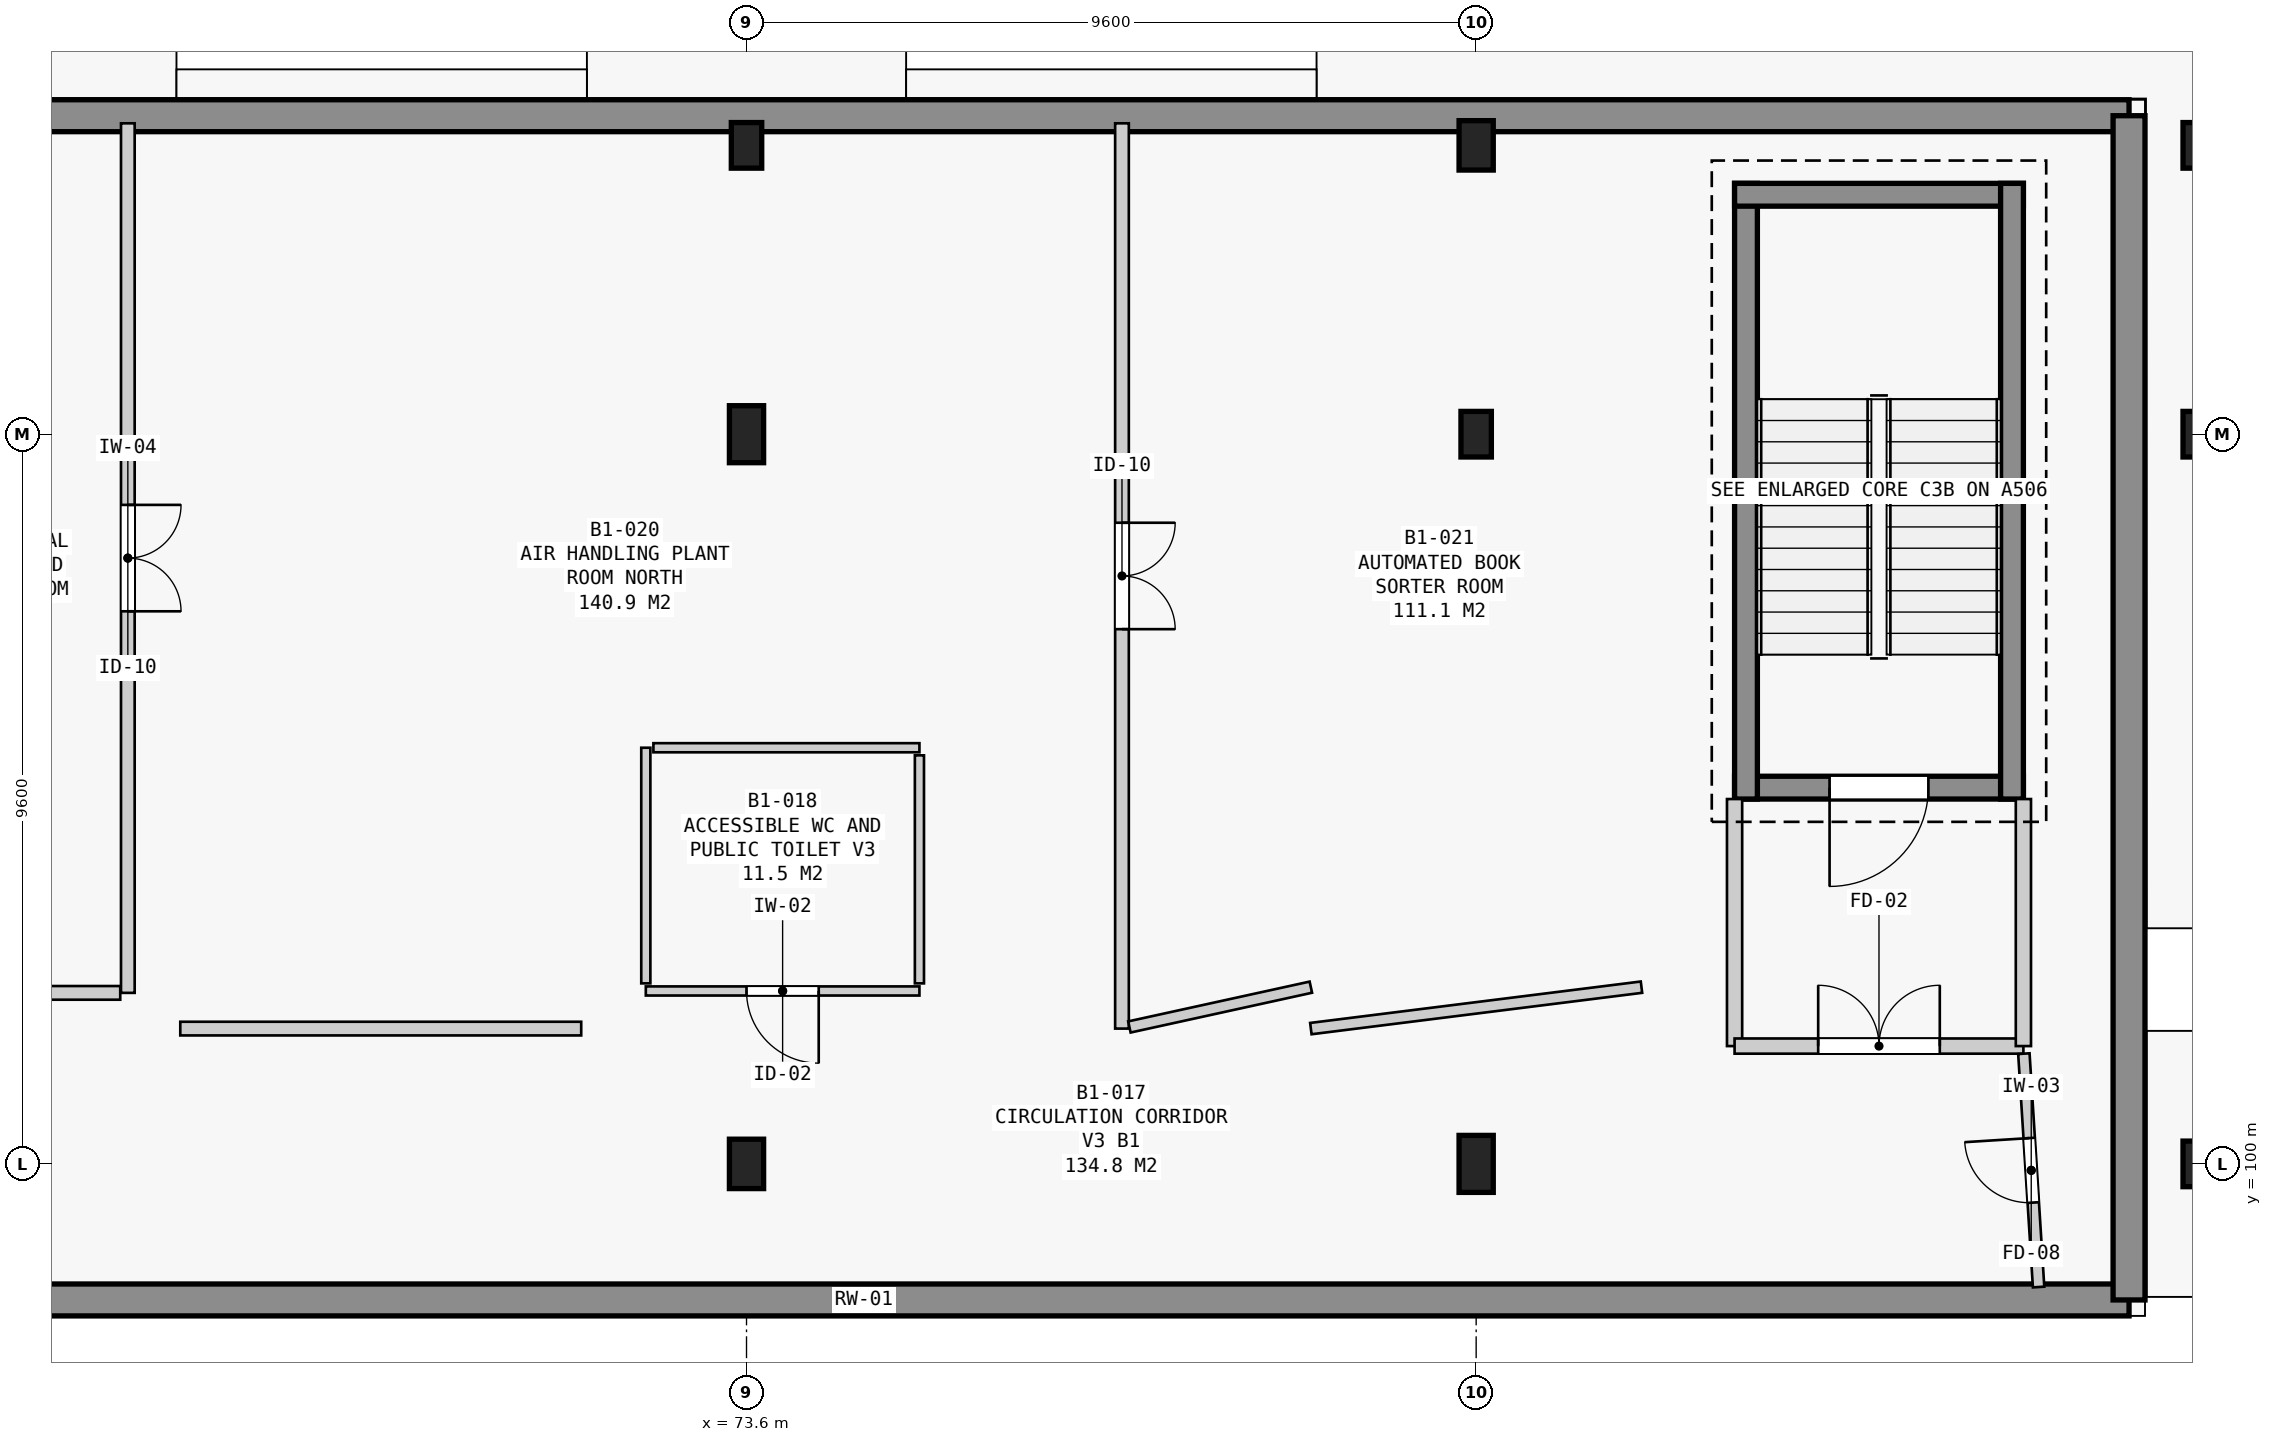
"""IFC4 building model, lengths in metres.
Left out: names, types, materials, properties, quantities, classifications, styles, units other than length and angle.
Written with IfcOpenShell. Run it as: python <this file> out.ifc"""

import sys

from ifc_helpers import new_model, si_unit, direction, frame, frame_2d, origin, origin_2d, place, context, subcontext, project, spatial, rectangle, extrude, element, fill, save


model = new_model("IFC4")
c1 = context("Model", 3, precision=1e-05, world=origin(), true_north=direction((0.0, 1.0)))
c2 = subcontext(c1, "Body", "Model", "MODEL_VIEW")
j1 = project(units=[si_unit("LENGTHUNIT", "METRE"), si_unit("PLANEANGLEUNIT", "RADIAN")], contexts=[c1])
p1 = place(None, origin())
s1 = spatial("IfcSite", under=j1, at=p1, CompositionType="ELEMENT")
p2 = place(p1, origin())
s2 = spatial("IfcBuilding", under=s1, at=p2, CompositionType="ELEMENT")
p3 = place(p2, frame((0.0, 0.0, -4.5)))
s3 = spatial("IfcBuildingStorey", under=s2, at=p3, CompositionType="ELEMENT", Elevation=-4.5)
p4 = place(p3, frame((73.6, 100.0, 0.0), z_axis=(0.0, 0.0, 1.0), x_axis=(1.0, 0.0, 0.0)))
e1 = element("IfcColumn", 1, at=p4, inside=s3, PredefinedType="COLUMN", context=c2, shape_type="SweptSolid", body=[
    extrude(rectangle(XDim=0.45, YDim=0.65, at=origin_2d()), origin(), (0.0, 0.0, 1.0), 4.5),
])
p5 = place(p3, frame((73.6, 109.6, 0.0), z_axis=(0.0, 0.0, 1.0), x_axis=(1.0, 0.0, 0.0)))
e2 = element("IfcColumn", 2, at=p5, inside=s3, PredefinedType="COLUMN", context=c2, shape_type="SweptSolid", body=[
    extrude(rectangle(XDim=0.45, YDim=0.75, at=origin_2d()), origin(), (0.0, 0.0, 1.0), 4.5),
])
p6 = place(p3, frame((73.6, 113.4, 0.0), z_axis=(0.0, 0.0, 1.0), x_axis=(1.0, 0.0, 0.0)))
e3 = element("IfcColumn", 3, at=p6, inside=s3, PredefinedType="COLUMN", context=c2, shape_type="SweptSolid", body=[
    extrude(rectangle(XDim=0.4, YDim=0.6, at=origin_2d()), origin(), (0.0, 0.0, 1.0), 4.5),
])
p7 = place(p3, frame((83.2, 100.0, 0.0), z_axis=(0.0, 0.0, 1.0), x_axis=(1.0, 0.0, 0.0)))
e4 = element("IfcColumn", 4, at=p7, inside=s3, PredefinedType="COLUMN", context=c2, shape_type="SweptSolid", body=[
    extrude(rectangle(XDim=0.45, YDim=0.75, at=origin_2d()), origin(), (0.0, 0.0, 1.0), 4.5),
])
p8 = place(p3, frame((83.2, 109.6, 0.0), z_axis=(0.0, 0.0, 1.0), x_axis=(1.0, 0.0, 0.0)))
e5 = element("IfcColumn", 5, at=p8, inside=s3, PredefinedType="COLUMN", context=c2, shape_type="SweptSolid", body=[
    extrude(rectangle(XDim=0.4, YDim=0.6, at=origin_2d()), origin(), (0.0, 0.0, 1.0), 4.5),
])
p9 = place(p3, frame((83.2, 113.4, 0.0), z_axis=(0.0, 0.0, 1.0), x_axis=(1.0, 0.0, 0.0)))
e6 = element("IfcColumn", 6, at=p9, inside=s3, PredefinedType="COLUMN", context=c2, shape_type="SweptSolid", body=[
    extrude(rectangle(XDim=0.45, YDim=0.65, at=origin_2d()), origin(), (0.0, 0.0, 1.0), 4.5),
])
for number, where, z_axis, x_axis in (
    (7, (92.8, 100.0, 0.0), (0.0, 0.0, 1.0), (1.0, 0.0, 0.0)),
    (8, (92.8, 109.6, 0.0), (0.0, 0.0, 1.0), (1.0, 0.0, 0.0)),
    (9, (92.8, 113.4, 0.0), (0.0, 0.0, 1.0), (1.0, 0.0, 0.0)),
):
    element("IfcColumn", number, at=place(p3, frame(where, z_axis=z_axis, x_axis=x_axis)), inside=s3, PredefinedType="COLUMN", context=c2, shape_type="SweptSolid", body=[
        extrude(rectangle(XDim=0.6, YDim=0.6, at=origin_2d()), origin(), (0.0, 0.0, 1.0), 4.5),
    ])
for number, where, z_axis, x_axis in (
    (10, (91.79, 98.21, 0.0), (0.0, 0.0, 1.0), (-1.0, 0.0, 0.0)),
    (11, (52.21, 113.79, 0.0), (0.0, 0.0, 1.0), (1.0, 0.0, 0.0)),
):
    element("IfcWall", number, at=place(p3, frame(where, z_axis=z_axis, x_axis=x_axis)), inside=s3, PredefinedType="SOLIDWALL", context=c2, shape_type="SweptSolid", body=[
        extrude(rectangle(XDim=39.58, YDim=0.42, at=frame_2d((19.79, 0.0))), origin(), (0.0, 0.0, 1.0), 4.5),
    ])
p10 = place(p3, frame((91.79, 113.79, 0.0), z_axis=(0.0, 0.0, 1.0), x_axis=(0.0, -1.0, 0.0)))
e12 = element("IfcWall", 12, at=p10, inside=s3, PredefinedType="SOLIDWALL", context=c2, shape_type="SweptSolid", body=[
    extrude(rectangle(XDim=15.58, YDim=0.42, at=frame_2d((7.79, 0.0))), origin(), (0.0, 0.0, 1.0), 4.5),
])
p11 = place(p3, frame((90.4, 104.95, 0.0), z_axis=(0.0, 0.0, 1.0), x_axis=(-1.0, 0.0, 0.0)))
e13 = element("IfcWall", 13, at=p11, inside=s3, PredefinedType="SHEAR", context=c2, shape_type="SweptSolid", body=[
    extrude(rectangle(XDim=3.8, YDim=0.3, at=frame_2d((1.9, 0.0))), origin(), (0.0, 0.0, 1.0), 4.1),
])
p12 = place(p11, frame((1.25, 0.0, 0.0)))
e14 = element("IfcOpeningElement", 14, at=p12, cuts=e13, PredefinedType="OPENING", context=c2, shape_type="SweptSolid", body=[
    extrude(rectangle(XDim=1.3, YDim=2.2, at=frame_2d((0.65, 1.1))), frame((0.0, 0.16, 0.0), z_axis=(0.0, -1.0, 0.0), x_axis=(1.0, 0.0, 0.0)), (0.0, 0.0, 1.0), 0.32),
])
p13 = place(p3, frame((86.75, 104.8, 0.0), z_axis=(0.0, 0.0, 1.0), x_axis=(0.0, 1.0, 0.0)))
e15 = element("IfcWall", 15, at=p13, inside=s3, PredefinedType="SHEAR", context=c2, shape_type="SweptSolid", body=[
    extrude(rectangle(XDim=8.1, YDim=0.3, at=frame_2d((4.05, 0.0))), origin(), (0.0, 0.0, 1.0), 4.1),
])
p14 = place(p3, frame((86.6, 112.75, 0.0), z_axis=(0.0, 0.0, 1.0), x_axis=(1.0, 0.0, 0.0)))
e16 = element("IfcWall", 16, at=p14, inside=s3, PredefinedType="SHEAR", context=c2, shape_type="SweptSolid", body=[
    extrude(rectangle(XDim=3.8, YDim=0.3, at=frame_2d((1.9, 0.0))), origin(), (0.0, 0.0, 1.0), 4.1),
])
p15 = place(p3, frame((90.25, 112.9, 0.0), z_axis=(0.0, 0.0, 1.0), x_axis=(0.0, -1.0, 0.0)))
e17 = element("IfcWall", 17, at=p15, inside=s3, PredefinedType="SHEAR", context=c2, shape_type="SweptSolid", body=[
    extrude(rectangle(XDim=8.1, YDim=0.3, at=frame_2d((4.05, 0.0))), origin(), (0.0, 0.0, 1.0), 4.1),
])
p16 = place(p3, frame((86.6, 104.8, 0.0), z_axis=(0.0, 0.0, 1.0), x_axis=(0.0, -1.0, 0.0)))
e18 = element("IfcWall", 18, at=p16, inside=s3, PredefinedType="STANDARD", context=c2, shape_type="SweptSolid", body=[
    extrude(rectangle(XDim=3.25, YDim=0.2, at=frame_2d((1.625, 0.0))), origin(), (0.0, 0.0, 1.0), 4.1),
])
p17 = place(p3, frame((86.6, 101.55, 0.0), z_axis=(0.0, 0.0, 1.0), x_axis=(1.0, 0.0, 0.0)))
e19 = element("IfcWall", 19, at=p17, inside=s3, PredefinedType="STANDARD", context=c2, shape_type="SweptSolid", body=[
    extrude(rectangle(XDim=3.8, YDim=0.2, at=frame_2d((1.9, 0.0))), origin(), (0.0, 0.0, 1.0), 4.1),
])
p18 = place(p17, frame((1.1, 0.0, 0.0)))
e20 = element("IfcOpeningElement", 20, at=p18, cuts=e19, PredefinedType="OPENING", context=c2, shape_type="SweptSolid", body=[
    extrude(rectangle(XDim=1.6, YDim=2.2, at=frame_2d((0.8, 1.1))), frame((0.0, 0.11, 0.0), z_axis=(0.0, -1.0, 0.0), x_axis=(1.0, 0.0, 0.0)), (0.0, 0.0, 1.0), 0.22),
])
p19 = place(p3, frame((90.4, 101.55, 0.0), z_axis=(0.0, 0.0, 1.0), x_axis=(0.0, 1.0, 0.0)))
e21 = element("IfcWall", 21, at=p19, inside=s3, PredefinedType="STANDARD", context=c2, shape_type="SweptSolid", body=[
    extrude(rectangle(XDim=3.25, YDim=0.2, at=frame_2d((1.625, 0.0))), origin(), (0.0, 0.0, 1.0), 4.1),
])
p20 = place(p3, frame((75.875, 102.275, 0.0), z_axis=(0.0, 0.0, 1.0), x_axis=(-1.0, 0.0, 0.0)))
e22 = element("IfcWall", 22, at=p20, inside=s3, PredefinedType="PARTITIONING", context=c2, shape_type="SweptSolid", body=[
    extrude(rectangle(XDim=3.6, YDim=0.12, at=frame_2d((1.8, 0.0))), origin(), (0.0, 0.0, 1.0), 3.38),
])
p21 = place(p20, frame((1.325, 0.0, 0.0)))
e23 = element("IfcOpeningElement", 23, at=p21, cuts=e22, PredefinedType="OPENING", context=c2, shape_type="SweptSolid", body=[
    extrude(rectangle(XDim=0.95, YDim=2.15, at=frame_2d((0.475, 1.075))), frame((0.0, 0.07, 0.0), z_axis=(0.0, -1.0, 0.0), x_axis=(1.0, 0.0, 0.0)), (0.0, 0.0, 1.0), 0.14),
])
p22 = place(p3, frame((72.275, 102.375, 0.0), z_axis=(0.0, 0.0, 1.0), x_axis=(0.0, 1.0, 0.0)))
e24 = element("IfcWall", 24, at=p22, inside=s3, PredefinedType="PARTITIONING", context=c2, shape_type="SweptSolid", body=[
    extrude(rectangle(XDim=3.1, YDim=0.12, at=frame_2d((1.55, 0.0))), origin(), (0.0, 0.0, 1.0), 4.1),
])
p23 = place(p3, frame((72.375, 105.475, 0.0), z_axis=(0.0, 0.0, 1.0), x_axis=(1.0, 0.0, 0.0)))
e25 = element("IfcWall", 25, at=p23, inside=s3, PredefinedType="PARTITIONING", context=c2, shape_type="SweptSolid", body=[
    extrude(rectangle(XDim=3.5, YDim=0.12, at=frame_2d((1.75, 0.0))), origin(), (0.0, 0.0, 1.0), 3.38),
])
p24 = place(p3, frame((75.875, 105.375, 0.0), z_axis=(0.0, 0.0, 1.0), x_axis=(0.0, -1.0, 0.0)))
e26 = element("IfcWall", 26, at=p24, inside=s3, PredefinedType="PARTITIONING", context=c2, shape_type="SweptSolid", body=[
    extrude(rectangle(XDim=3.0, YDim=0.12, at=frame_2d((1.5, 0.0))), origin(), (0.0, 0.0, 1.0), 4.1),
])
p25 = place(p3, frame((65.46, 113.69, 0.0), z_axis=(0.0, 0.0, 1.0), x_axis=(0.0, -1.0, 0.0)))
e27 = element("IfcWall", 27, at=p25, inside=s3, PredefinedType="PARTITIONING", context=c2, shape_type="SweptSolid", body=[
    extrude(rectangle(XDim=11.44, YDim=0.18, at=frame_2d((5.72, 0.0))), origin(), (0.0, 0.0, 1.0), 3.28),
])
p26 = place(p25, frame((5.02, 0.0, 0.0)))
e28 = element("IfcOpeningElement", 28, at=p26, cuts=e27, PredefinedType="OPENING", context=c2, shape_type="SweptSolid", body=[
    extrude(rectangle(XDim=1.4, YDim=2.2, at=frame_2d((0.7, 1.1))), frame((0.0, 0.1, 0.0), z_axis=(0.0, -1.0, 0.0), x_axis=(1.0, 0.0, 0.0)), (0.0, 0.0, 1.0), 0.2),
])
p27 = place(p3, frame((65.36, 102.25, 0.0), z_axis=(0.0, 0.0, 1.0), x_axis=(-1.0, 0.0, 0.0)))
e29 = element("IfcWall", 29, at=p27, inside=s3, PredefinedType="PARTITIONING", context=c2, shape_type="SweptSolid", body=[
    extrude(rectangle(XDim=3.86, YDim=0.18, at=frame_2d((1.93, 0.0))), origin(), (0.0, 0.0, 1.0), 3.38),
])
p28 = place(p3, frame((71.425, 101.78, 0.0), z_axis=(0.0, 0.0, 1.0), x_axis=(-1.0, 0.0, 0.0)))
e30 = element("IfcWall", 30, at=p28, inside=s3, PredefinedType="PARTITIONING", context=c2, shape_type="SweptSolid", body=[
    extrude(rectangle(XDim=5.275, YDim=0.18, at=frame_2d((2.638, 0.0))), origin(), (0.0, 0.0, 1.0), 3.63),
])
p29 = place(p3, frame((78.54, 113.69, 0.0), z_axis=(0.0, 0.0, 1.0), x_axis=(0.0, -1.0, 0.0)))
e31 = element("IfcWall", 31, at=p29, inside=s3, PredefinedType="PARTITIONING", context=c2, shape_type="SweptSolid", body=[
    extrude(rectangle(XDim=11.91, YDim=0.18, at=frame_2d((5.955, 0.0))), origin(), (0.0, 0.0, 1.0), 3.43),
])
p30 = place(p29, frame((5.255, 0.0, 0.0)))
e32 = element("IfcOpeningElement", 32, at=p30, cuts=e31, PredefinedType="OPENING", context=c2, shape_type="SweptSolid", body=[
    extrude(rectangle(XDim=1.4, YDim=2.2, at=frame_2d((0.7, 1.1))), frame((0.0, 0.1, 0.0), z_axis=(0.0, -1.0, 0.0), x_axis=(1.0, 0.0, 0.0)), (0.0, 0.0, 1.0), 0.2),
])
p31 = place(p3, frame((90.6, 98.38, 0.0), z_axis=(0.0, 0.0, 1.0), x_axis=(-0.063010671556, 0.998012853259, 0.0)))
e33 = element("IfcWall", 33, at=p31, inside=s3, PredefinedType="PARTITIONING", context=c2, shape_type="SweptSolid", body=[
    extrude(rectangle(XDim=3.076, YDim=0.15, at=frame_2d((1.538, 0.0))), origin(), (0.0, 0.0, 1.0), 4.1),
])
p32 = place(p31, frame((1.113, 0.0, 0.0)))
e34 = element("IfcOpeningElement", 34, at=p32, cuts=e33, PredefinedType="OPENING", context=c2, shape_type="SweptSolid", body=[
    extrude(rectangle(XDim=0.85, YDim=2.1, at=frame_2d((0.425, 1.05))), frame((0.0, 0.085, 0.0), z_axis=(0.0, -1.0, 0.0), x_axis=(1.0, 0.0, 0.0)), (0.0, 0.0, 1.0), 0.17),
])
p33 = place(p3, frame((85.375, 102.325, 0.0), z_axis=(0.0, 0.0, 1.0), x_axis=(-0.992245286586, -0.124295177891, 0.0)))
e35 = element("IfcWall", 35, at=p33, inside=s3, PredefinedType="PARTITIONING", context=c2, shape_type="SweptSolid", body=[
    extrude(rectangle(XDim=4.384, YDim=0.15, at=frame_2d((2.192, 0.0))), origin(), (0.0, 0.0, 1.0), 3.38),
])
p34 = place(p3, frame((81.025, 102.325, 0.0), z_axis=(0.0, 0.0, 1.0), x_axis=(-0.976794321877, -0.214179487227, 0.0)))
e36 = element("IfcWall", 36, at=p34, inside=s3, PredefinedType="PARTITIONING", context=c2, shape_type="SweptSolid", body=[
    extrude(rectangle(XDim=2.444, YDim=0.15, at=frame_2d((1.222, 0.0))), origin(), (0.0, 0.0, 1.0), 4.1),
])
p35 = place(p12, origin())
e37 = element("IfcDoor", 37, at=p35, inside=s3, OperationType="SINGLE_SWING_RIGHT", PredefinedType="DOOR", context=c2, shape_type="SweptSolid", body=[
    extrude(rectangle(XDim=1.3, YDim=2.2, at=frame_2d((0.65, 1.1))), frame((0.0, 0.025, 0.0), z_axis=(0.0, -1.0, 0.0), x_axis=(1.0, 0.0, 0.0)), (0.0, 0.0, 1.0), 0.05),
])
fill(e14, e37)
p36 = place(p18, origin())
e38 = element("IfcDoor", 38, at=p36, inside=s3, OperationType="DOUBLE_DOOR_SINGLE_SWING", PredefinedType="DOOR", context=c2, shape_type="SweptSolid", body=[
    extrude(rectangle(XDim=1.6, YDim=2.2, at=frame_2d((0.8, 1.1))), frame((0.0, 0.025, 0.0), z_axis=(0.0, -1.0, 0.0), x_axis=(1.0, 0.0, 0.0)), (0.0, 0.0, 1.0), 0.05),
])
fill(e20, e38)
p37 = place(p21, origin())
e39 = element("IfcDoor", 39, at=p37, inside=s3, OperationType="SINGLE_SWING_LEFT", PredefinedType="DOOR", context=c2, shape_type="SweptSolid", body=[
    extrude(rectangle(XDim=0.95, YDim=2.15, at=frame_2d((0.475, 1.075))), frame((0.0, 0.025, 0.0), z_axis=(0.0, -1.0, 0.0), x_axis=(1.0, 0.0, 0.0)), (0.0, 0.0, 1.0), 0.05),
])
fill(e23, e39)
p38 = place(p26, origin())
e40 = element("IfcDoor", 40, at=p38, inside=s3, OperationType="DOUBLE_DOOR_SINGLE_SWING", PredefinedType="DOOR", context=c2, shape_type="SweptSolid", body=[
    extrude(rectangle(XDim=1.4, YDim=2.2, at=frame_2d((0.7, 1.1))), frame((0.0, 0.025, 0.0), z_axis=(0.0, -1.0, 0.0), x_axis=(1.0, 0.0, 0.0)), (0.0, 0.0, 1.0), 0.05),
])
fill(e28, e40)
p39 = place(p30, origin())
e41 = element("IfcDoor", 41, at=p39, inside=s3, OperationType="DOUBLE_DOOR_SINGLE_SWING", PredefinedType="DOOR", context=c2, shape_type="SweptSolid", body=[
    extrude(rectangle(XDim=1.4, YDim=2.2, at=frame_2d((0.7, 1.1))), frame((0.0, 0.025, 0.0), z_axis=(0.0, -1.0, 0.0), x_axis=(1.0, 0.0, 0.0)), (0.0, 0.0, 1.0), 0.05),
])
fill(e32, e41)
p40 = place(p32, origin())
e42 = element("IfcDoor", 42, at=p40, inside=s3, OperationType="SINGLE_SWING_RIGHT", PredefinedType="DOOR", context=c2, shape_type="SweptSolid", body=[
    extrude(rectangle(XDim=0.85, YDim=2.1, at=frame_2d((0.425, 1.05))), frame((0.0, 0.025, 0.0), z_axis=(0.0, -1.0, 0.0), x_axis=(1.0, 0.0, 0.0)), (0.0, 0.0, 1.0), 0.05),
])
fill(e34, e42)
save(model, sys.argv[1])
